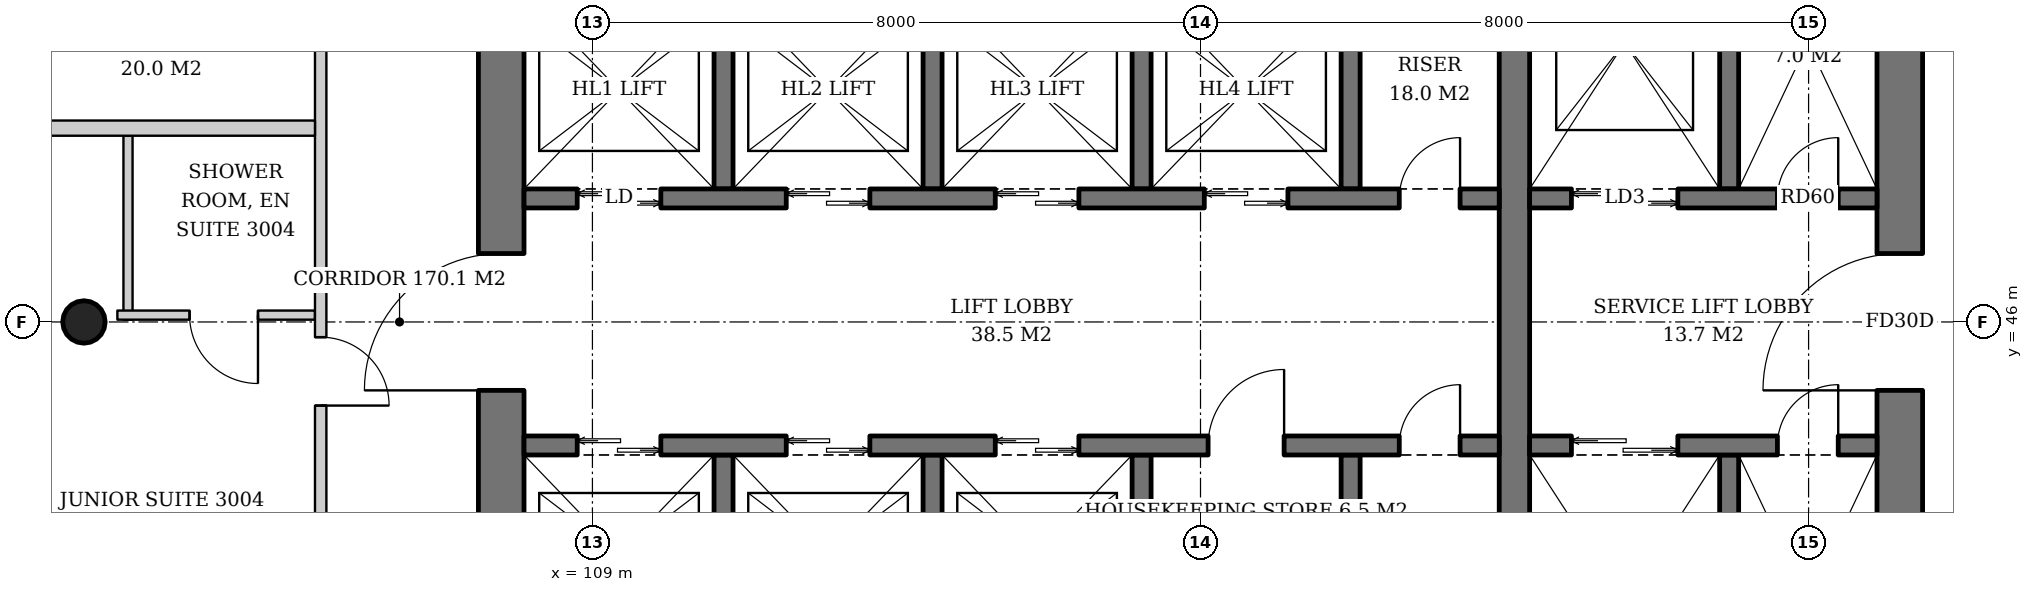
"""IFC4 building model, lengths in metres.
Left out: names, types, materials, properties, quantities, classifications, styles, units other than length and angle.
Written with IfcOpenShell. Run it as: python <this file> out.ifc"""

import sys

from ifc_helpers import new_model, si_unit, direction, frame, frame_2d, origin, origin_2d, place, context, subcontext, project, spatial, rectangle, hollow_circle, extrude, element, fill, save


model = new_model("IFC4")
c1 = context("Model", 3, precision=1e-05, world=origin(), true_north=direction((0.0, 1.0)))
c2 = subcontext(c1, "Body", "Model", "MODEL_VIEW")
j1 = project(units=[si_unit("LENGTHUNIT", "METRE"), si_unit("PLANEANGLEUNIT", "RADIAN")], contexts=[c1])
p1 = place(None, origin())
s1 = spatial("IfcSite", under=j1, at=p1, CompositionType="ELEMENT")
p2 = place(p1, origin())
s2 = spatial("IfcBuilding", under=s1, at=p2, CompositionType="ELEMENT")
p3 = place(p2, frame((0.0, 0.0, 119.8)))
s3 = spatial("IfcBuildingStorey", under=s2, at=p3, CompositionType="ELEMENT", Elevation=119.8)
p4 = place(p3, frame((102.259, 46.0, 0.0), z_axis=(0.043069538298, 0.0, 0.999072076915), x_axis=(0.0, 1.0, 0.0)))
e1 = element("IfcColumn", 1, at=p4, inside=s3, PredefinedType="COLUMN", context=c2, shape_type="SweptSolid", body=[
    extrude(hollow_circle(Radius=0.28, WallThickness=0.02, at=origin_2d()), origin(), (0.0, 0.0, 1.0), 3.803),
])
p5 = place(p3, frame((107.8, 37.1, 0.0), z_axis=(0.0, 0.0, 1.0), x_axis=(0.0, 1.0, 0.0)))
e2 = element("IfcWall", 2, at=p5, inside=s3, PredefinedType="SHEAR", context=c2, shape_type="SweptSolid", body=[
    extrude(rectangle(XDim=17.8, YDim=0.6, at=frame_2d((8.9, 0.0))), origin(), (0.0, 0.0, 1.0), 3.8),
])
p6 = place(p5, frame((8.0, 0.0, 0.0)))
e3 = element("IfcOpeningElement", 3, at=p6, cuts=e2, PredefinedType="OPENING", context=c2, shape_type="SweptSolid", body=[
    extrude(rectangle(XDim=1.8, YDim=2.4, at=frame_2d((0.9, 1.2))), frame((0.0, 0.31, 0.0), z_axis=(0.0, -1.0, 0.0), x_axis=(1.0, 0.0, 0.0)), (0.0, 0.0, 1.0), 0.62),
])
p7 = place(p3, frame((126.2, 37.1, 0.0), z_axis=(0.0, 0.0, 1.0), x_axis=(0.0, 1.0, 0.0)))
e4 = element("IfcWall", 4, at=p7, inside=s3, PredefinedType="SHEAR", context=c2, shape_type="SweptSolid", body=[
    extrude(rectangle(XDim=17.8, YDim=0.6, at=frame_2d((8.9, 0.0))), origin(), (0.0, 0.0, 1.0), 3.8),
])
p8 = place(p7, frame((8.0, 0.0, 0.0)))
e5 = element("IfcOpeningElement", 5, at=p8, cuts=e4, PredefinedType="OPENING", context=c2, shape_type="SweptSolid", body=[
    extrude(rectangle(XDim=1.8, YDim=2.4, at=frame_2d((0.9, 1.2))), frame((0.0, 0.31, 0.0), z_axis=(0.0, -1.0, 0.0), x_axis=(1.0, 0.0, 0.0)), (0.0, 0.0, 1.0), 0.62),
])
p9 = place(p3, frame((121.13, 40.4, 0.0), z_axis=(0.0, 0.0, 1.0), x_axis=(0.0, 1.0, 0.0)))
e6 = element("IfcWall", 6, at=p9, inside=s3, PredefinedType="SHEAR", context=c2, shape_type="SweptSolid", body=[
    extrude(rectangle(XDim=11.2, YDim=0.4, at=frame_2d((5.6, 0.0))), origin(), (0.0, 0.0, 1.0), 3.8),
])
for number, where, z_axis, x_axis in (
    (7, (110.725, 47.75, 0.0), (0.0, 0.0, 1.0), (0.0, 1.0, 0.0)),
    (8, (113.475, 47.75, 0.0), (0.0, 0.0, 1.0), (0.0, 1.0, 0.0)),
    (9, (116.225, 47.75, 0.0), (0.0, 0.0, 1.0), (0.0, 1.0, 0.0)),
    (10, (118.975, 47.75, 0.0), (0.0, 0.0, 1.0), (0.0, 1.0, 0.0)),
):
    element("IfcWall", number, at=place(p3, frame(where, z_axis=z_axis, x_axis=x_axis)), inside=s3, PredefinedType="SHEAR", context=c2, shape_type="SweptSolid", body=[
        extrude(rectangle(XDim=2.6, YDim=0.25, at=frame_2d((1.3, 0.0))), origin(), (0.0, 0.0, 1.0), 3.8),
    ])
p10 = place(p3, frame((108.1, 47.625, 0.0), z_axis=(0.0, 0.0, 1.0), x_axis=(1.0, 0.0, 0.0)))
e11 = element("IfcWall", 11, at=p10, inside=s3, PredefinedType="SHEAR", context=c2, shape_type="SweptSolid", body=[
    extrude(rectangle(XDim=12.83, YDim=0.25, at=frame_2d((6.415, 0.0))), origin(), (0.0, 0.0, 1.0), 3.8),
])
p11 = place(p10, frame((0.7, 0.0, 0.0)))
e12 = element("IfcOpeningElement", 12, at=p11, cuts=e11, PredefinedType="OPENING", context=c2, shape_type="SweptSolid", body=[
    extrude(rectangle(XDim=1.1, YDim=2.2, at=frame_2d((0.55, 1.1))), frame((0.0, 0.135, 0.0), z_axis=(0.0, -1.0, 0.0), x_axis=(1.0, 0.0, 0.0)), (0.0, 0.0, 1.0), 0.27),
])
p12 = place(p10, frame((3.45, 0.0, 0.0)))
e13 = element("IfcOpeningElement", 13, at=p12, cuts=e11, PredefinedType="OPENING", context=c2, shape_type="SweptSolid", body=[
    extrude(rectangle(XDim=1.1, YDim=2.2, at=frame_2d((0.55, 1.1))), frame((0.0, 0.135, 0.0), z_axis=(0.0, -1.0, 0.0), x_axis=(1.0, 0.0, 0.0)), (0.0, 0.0, 1.0), 0.27),
])
p13 = place(p10, frame((6.2, 0.0, 0.0)))
e14 = element("IfcOpeningElement", 14, at=p13, cuts=e11, PredefinedType="OPENING", context=c2, shape_type="SweptSolid", body=[
    extrude(rectangle(XDim=1.1, YDim=2.2, at=frame_2d((0.55, 1.1))), frame((0.0, 0.135, 0.0), z_axis=(0.0, -1.0, 0.0), x_axis=(1.0, 0.0, 0.0)), (0.0, 0.0, 1.0), 0.27),
])
p14 = place(p10, frame((8.95, 0.0, 0.0)))
e15 = element("IfcOpeningElement", 15, at=p14, cuts=e11, PredefinedType="OPENING", context=c2, shape_type="SweptSolid", body=[
    extrude(rectangle(XDim=1.1, YDim=2.2, at=frame_2d((0.55, 1.1))), frame((0.0, 0.135, 0.0), z_axis=(0.0, -1.0, 0.0), x_axis=(1.0, 0.0, 0.0)), (0.0, 0.0, 1.0), 0.27),
])
p15 = place(p10, frame((11.515, 0.0, 0.0)))
e16 = element("IfcOpeningElement", 16, at=p15, cuts=e11, PredefinedType="OPENING", context=c2, shape_type="SweptSolid", body=[
    extrude(rectangle(XDim=0.8, YDim=2.0, at=frame_2d((0.4, 1.0))), frame((0.0, 0.135, 0.0), z_axis=(0.0, -1.0, 0.0), x_axis=(1.0, 0.0, 0.0)), (0.0, 0.0, 1.0), 0.27),
])
for number, where, z_axis, x_axis in (
    (17, (110.725, 44.25, 0.0), (0.0, 0.0, 1.0), (0.0, -1.0, 0.0)),
    (18, (113.475, 44.25, 0.0), (0.0, 0.0, 1.0), (0.0, -1.0, 0.0)),
    (19, (116.225, 44.25, 0.0), (0.0, 0.0, 1.0), (0.0, -1.0, 0.0)),
    (20, (118.975, 44.25, 0.0), (0.0, 0.0, 1.0), (0.0, -1.0, 0.0)),
):
    element("IfcWall", number, at=place(p3, frame(where, z_axis=z_axis, x_axis=x_axis)), inside=s3, PredefinedType="SHEAR", context=c2, shape_type="SweptSolid", body=[
        extrude(rectangle(XDim=2.6, YDim=0.25, at=frame_2d((1.3, 0.0))), origin(), (0.0, 0.0, 1.0), 3.8),
    ])
p16 = place(p3, frame((108.1, 44.375, 0.0), z_axis=(0.0, 0.0, 1.0), x_axis=(1.0, 0.0, 0.0)))
e21 = element("IfcWall", 21, at=p16, inside=s3, PredefinedType="SHEAR", context=c2, shape_type="SweptSolid", body=[
    extrude(rectangle(XDim=12.83, YDim=0.25, at=frame_2d((6.415, 0.0))), origin(), (0.0, 0.0, 1.0), 3.8),
])
p17 = place(p16, frame((0.7, 0.0, 0.0)))
e22 = element("IfcOpeningElement", 22, at=p17, cuts=e21, PredefinedType="OPENING", context=c2, shape_type="SweptSolid", body=[
    extrude(rectangle(XDim=1.1, YDim=2.2, at=frame_2d((0.55, 1.1))), frame((0.0, 0.135, 0.0), z_axis=(0.0, -1.0, 0.0), x_axis=(1.0, 0.0, 0.0)), (0.0, 0.0, 1.0), 0.27),
])
p18 = place(p16, frame((3.45, 0.0, 0.0)))
e23 = element("IfcOpeningElement", 23, at=p18, cuts=e21, PredefinedType="OPENING", context=c2, shape_type="SweptSolid", body=[
    extrude(rectangle(XDim=1.1, YDim=2.2, at=frame_2d((0.55, 1.1))), frame((0.0, 0.135, 0.0), z_axis=(0.0, -1.0, 0.0), x_axis=(1.0, 0.0, 0.0)), (0.0, 0.0, 1.0), 0.27),
])
p19 = place(p16, frame((6.2, 0.0, 0.0)))
e24 = element("IfcOpeningElement", 24, at=p19, cuts=e21, PredefinedType="OPENING", context=c2, shape_type="SweptSolid", body=[
    extrude(rectangle(XDim=1.1, YDim=2.2, at=frame_2d((0.55, 1.1))), frame((0.0, 0.135, 0.0), z_axis=(0.0, -1.0, 0.0), x_axis=(1.0, 0.0, 0.0)), (0.0, 0.0, 1.0), 0.27),
])
p20 = place(p16, frame((9.0, 0.0, 0.0)))
e25 = element("IfcOpeningElement", 25, at=p20, cuts=e21, PredefinedType="OPENING", context=c2, shape_type="SweptSolid", body=[
    extrude(rectangle(XDim=1.0, YDim=2.1, at=frame_2d((0.5, 1.05))), frame((0.0, 0.135, 0.0), z_axis=(0.0, -1.0, 0.0), x_axis=(1.0, 0.0, 0.0)), (0.0, 0.0, 1.0), 0.27),
])
p21 = place(p16, frame((11.515, 0.0, 0.0)))
e26 = element("IfcOpeningElement", 26, at=p21, cuts=e21, PredefinedType="OPENING", context=c2, shape_type="SweptSolid", body=[
    extrude(rectangle(XDim=0.8, YDim=2.0, at=frame_2d((0.4, 1.0))), frame((0.0, 0.135, 0.0), z_axis=(0.0, -1.0, 0.0), x_axis=(1.0, 0.0, 0.0)), (0.0, 0.0, 1.0), 0.27),
])
p22 = place(p3, frame((123.955, 47.75, 0.0), z_axis=(0.0, 0.0, 1.0), x_axis=(0.0, 1.0, 0.0)))
e27 = element("IfcWall", 27, at=p22, inside=s3, PredefinedType="SHEAR", context=c2, shape_type="SweptSolid", body=[
    extrude(rectangle(XDim=3.85, YDim=0.25, at=frame_2d((1.925, 0.0))), origin(), (0.0, 0.0, 1.0), 3.8),
])
p23 = place(p3, frame((121.33, 47.625, 0.0), z_axis=(0.0, 0.0, 1.0), x_axis=(1.0, 0.0, 0.0)))
e28 = element("IfcWall", 28, at=p23, inside=s3, PredefinedType="SHEAR", context=c2, shape_type="SweptSolid", body=[
    extrude(rectangle(XDim=4.57, YDim=0.25, at=frame_2d((2.285, 0.0))), origin(), (0.0, 0.0, 1.0), 3.8),
])
p24 = place(p23, frame((0.55, 0.0, 0.0)))
e29 = element("IfcOpeningElement", 29, at=p24, cuts=e28, PredefinedType="OPENING", context=c2, shape_type="SweptSolid", body=[
    extrude(rectangle(XDim=1.4, YDim=2.4, at=frame_2d((0.7, 1.2))), frame((0.0, 0.135, 0.0), z_axis=(0.0, -1.0, 0.0), x_axis=(1.0, 0.0, 0.0)), (0.0, 0.0, 1.0), 0.27),
])
p25 = place(p23, frame((3.26, 0.0, 0.0)))
e30 = element("IfcOpeningElement", 30, at=p25, cuts=e28, PredefinedType="OPENING", context=c2, shape_type="SweptSolid", body=[
    extrude(rectangle(XDim=0.8, YDim=2.0, at=frame_2d((0.4, 1.0))), frame((0.0, 0.135, 0.0), z_axis=(0.0, -1.0, 0.0), x_axis=(1.0, 0.0, 0.0)), (0.0, 0.0, 1.0), 0.27),
])
p26 = place(p3, frame((123.955, 44.25, 0.0), z_axis=(0.0, 0.0, 1.0), x_axis=(0.0, -1.0, 0.0)))
e31 = element("IfcWall", 31, at=p26, inside=s3, PredefinedType="SHEAR", context=c2, shape_type="SweptSolid", body=[
    extrude(rectangle(XDim=3.85, YDim=0.25, at=frame_2d((1.925, 0.0))), origin(), (0.0, 0.0, 1.0), 3.8),
])
p27 = place(p3, frame((121.33, 44.375, 0.0), z_axis=(0.0, 0.0, 1.0), x_axis=(1.0, 0.0, 0.0)))
e32 = element("IfcWall", 32, at=p27, inside=s3, PredefinedType="SHEAR", context=c2, shape_type="SweptSolid", body=[
    extrude(rectangle(XDim=4.57, YDim=0.25, at=frame_2d((2.285, 0.0))), origin(), (0.0, 0.0, 1.0), 3.8),
])
p28 = place(p27, frame((0.55, 0.0, 0.0)))
e33 = element("IfcOpeningElement", 33, at=p28, cuts=e32, PredefinedType="OPENING", context=c2, shape_type="SweptSolid", body=[
    extrude(rectangle(XDim=1.4, YDim=2.4, at=frame_2d((0.7, 1.2))), frame((0.0, 0.135, 0.0), z_axis=(0.0, -1.0, 0.0), x_axis=(1.0, 0.0, 0.0)), (0.0, 0.0, 1.0), 0.27),
])
p29 = place(p27, frame((3.26, 0.0, 0.0)))
e34 = element("IfcOpeningElement", 34, at=p29, cuts=e32, PredefinedType="OPENING", context=c2, shape_type="SweptSolid", body=[
    extrude(rectangle(XDim=0.8, YDim=2.0, at=frame_2d((0.4, 1.0))), frame((0.0, 0.135, 0.0), z_axis=(0.0, -1.0, 0.0), x_axis=(1.0, 0.0, 0.0)), (0.0, 0.0, 1.0), 0.27),
])
p30 = place(p3, frame((102.89, 48.45, 0.0), z_axis=(0.0, 0.0, 1.0), x_axis=(0.0, -1.0, 0.0)))
e35 = element("IfcWall", 35, at=p30, inside=s3, PredefinedType="PARTITIONING", context=c2, shape_type="SweptSolid", body=[
    extrude(rectangle(XDim=2.42, YDim=0.12, at=frame_2d((1.21, 0.0))), origin(), (0.0, 0.0, 1.0), 3.0),
])
p31 = place(p3, frame((105.35, 46.09, 0.0), z_axis=(0.0, 0.0, 1.0), x_axis=(-1.0, 0.0, 0.0)))
e36 = element("IfcWall", 36, at=p31, inside=s3, PredefinedType="PARTITIONING", context=c2, shape_type="SweptSolid", body=[
    extrude(rectangle(XDim=2.6, YDim=0.12, at=frame_2d((1.3, 0.0))), origin(), (0.0, 0.0, 1.0), 3.6),
])
p32 = place(p31, frame((0.75, 0.0, 0.0)))
e37 = element("IfcOpeningElement", 37, at=p32, cuts=e36, PredefinedType="OPENING", context=c2, shape_type="SweptSolid", body=[
    extrude(rectangle(XDim=0.9, YDim=2.1, at=frame_2d((0.45, 1.05))), frame((0.0, 0.07, 0.0), z_axis=(0.0, -1.0, 0.0), x_axis=(1.0, 0.0, 0.0)), (0.0, 0.0, 1.0), 0.14),
])
p33 = place(p3, frame((105.425, 56.793, 0.0), z_axis=(0.0, 0.0, 1.0), x_axis=(0.0, -1.0, 0.0)))
e38 = element("IfcWall", 38, at=p33, inside=s3, PredefinedType="PARTITIONING", context=c2, shape_type="SweptSolid", body=[
    extrude(rectangle(XDim=21.586, YDim=0.15, at=frame_2d((10.793, 0.0))), origin(), (0.0, 0.0, 1.0), 2.9),
])
p34 = place(p33, frame((0.718, 0.0, 0.0)))
e39 = element("IfcOpeningElement", 39, at=p34, cuts=e38, PredefinedType="OPENING", context=c2, shape_type="SweptSolid", body=[
    extrude(rectangle(XDim=0.9, YDim=2.1, at=frame_2d((0.45, 1.05))), frame((0.0, 0.085, 0.0), z_axis=(0.0, -1.0, 0.0), x_axis=(1.0, 0.0, 0.0)), (0.0, 0.0, 1.0), 0.17),
])
p35 = place(p33, frame((5.843, 0.0, 0.0)))
e40 = element("IfcOpeningElement", 40, at=p35, cuts=e38, PredefinedType="OPENING", context=c2, shape_type="SweptSolid", body=[
    extrude(rectangle(XDim=1.0, YDim=2.1, at=frame_2d((0.5, 1.05))), frame((0.0, 0.085, 0.0), z_axis=(0.0, -1.0, 0.0), x_axis=(1.0, 0.0, 0.0)), (0.0, 0.0, 1.0), 0.17),
])
p36 = place(p33, frame((10.993, 0.0, 0.0)))
e41 = element("IfcOpeningElement", 41, at=p36, cuts=e38, PredefinedType="OPENING", context=c2, shape_type="SweptSolid", body=[
    extrude(rectangle(XDim=0.9, YDim=2.1, at=frame_2d((0.45, 1.05))), frame((0.0, 0.085, 0.0), z_axis=(0.0, -1.0, 0.0), x_axis=(1.0, 0.0, 0.0)), (0.0, 0.0, 1.0), 0.17),
])
p37 = place(p3, frame((105.35, 48.55, 0.0), z_axis=(0.0, 0.0, 1.0), x_axis=(-1.0, 0.0, 0.0)))
e42 = element("IfcWall", 42, at=p37, inside=s3, PredefinedType="PARTITIONING", context=c2, shape_type="SweptSolid", body=[
    extrude(rectangle(XDim=4.14, YDim=0.2, at=frame_2d((2.07, 0.0))), origin(), (0.0, 0.0, 1.0), 3.2),
])
p38 = place(p11, origin())
e43 = element("IfcDoor", 43, at=p38, inside=s3, OperationType="DOUBLE_DOOR_SLIDING", PredefinedType="DOOR", context=c2, shape_type="SweptSolid", body=[
    extrude(rectangle(XDim=1.1, YDim=2.2, at=frame_2d((0.55, 1.1))), frame((0.0, 0.025, 0.0), z_axis=(0.0, -1.0, 0.0), x_axis=(1.0, 0.0, 0.0)), (0.0, 0.0, 1.0), 0.05),
])
fill(e12, e43)
p39 = place(p12, origin())
e44 = element("IfcDoor", 44, at=p39, inside=s3, OperationType="DOUBLE_DOOR_SLIDING", PredefinedType="DOOR", context=c2, shape_type="SweptSolid", body=[
    extrude(rectangle(XDim=1.1, YDim=2.2, at=frame_2d((0.55, 1.1))), frame((0.0, 0.025, 0.0), z_axis=(0.0, -1.0, 0.0), x_axis=(1.0, 0.0, 0.0)), (0.0, 0.0, 1.0), 0.05),
])
fill(e13, e44)
p40 = place(p13, origin())
e45 = element("IfcDoor", 45, at=p40, inside=s3, OperationType="DOUBLE_DOOR_SLIDING", PredefinedType="DOOR", context=c2, shape_type="SweptSolid", body=[
    extrude(rectangle(XDim=1.1, YDim=2.2, at=frame_2d((0.55, 1.1))), frame((0.0, 0.025, 0.0), z_axis=(0.0, -1.0, 0.0), x_axis=(1.0, 0.0, 0.0)), (0.0, 0.0, 1.0), 0.05),
])
fill(e14, e45)
p41 = place(p14, origin())
e46 = element("IfcDoor", 46, at=p41, inside=s3, OperationType="DOUBLE_DOOR_SLIDING", PredefinedType="DOOR", context=c2, shape_type="SweptSolid", body=[
    extrude(rectangle(XDim=1.1, YDim=2.2, at=frame_2d((0.55, 1.1))), frame((0.0, 0.025, 0.0), z_axis=(0.0, -1.0, 0.0), x_axis=(1.0, 0.0, 0.0)), (0.0, 0.0, 1.0), 0.05),
])
fill(e15, e46)
p42 = place(p15, origin())
e47 = element("IfcDoor", 47, at=p42, inside=s3, OperationType="SINGLE_SWING_RIGHT", PredefinedType="DOOR", context=c2, shape_type="SweptSolid", body=[
    extrude(rectangle(XDim=0.8, YDim=2.0, at=frame_2d((0.4, 1.0))), frame((0.0, 0.025, 0.0), z_axis=(0.0, -1.0, 0.0), x_axis=(1.0, 0.0, 0.0)), (0.0, 0.0, 1.0), 0.05),
])
fill(e16, e47)
p43 = place(p17, origin())
e48 = element("IfcDoor", 48, at=p43, inside=s3, OperationType="DOUBLE_DOOR_SLIDING", PredefinedType="DOOR", context=c2, shape_type="SweptSolid", body=[
    extrude(rectangle(XDim=1.1, YDim=2.2, at=frame_2d((0.55, 1.1))), frame((0.0, 0.025, 0.0), z_axis=(0.0, -1.0, 0.0), x_axis=(1.0, 0.0, 0.0)), (0.0, 0.0, 1.0), 0.05),
])
fill(e22, e48)
p44 = place(p18, origin())
e49 = element("IfcDoor", 49, at=p44, inside=s3, OperationType="DOUBLE_DOOR_SLIDING", PredefinedType="DOOR", context=c2, shape_type="SweptSolid", body=[
    extrude(rectangle(XDim=1.1, YDim=2.2, at=frame_2d((0.55, 1.1))), frame((0.0, 0.025, 0.0), z_axis=(0.0, -1.0, 0.0), x_axis=(1.0, 0.0, 0.0)), (0.0, 0.0, 1.0), 0.05),
])
fill(e23, e49)
p45 = place(p19, origin())
e50 = element("IfcDoor", 50, at=p45, inside=s3, OperationType="DOUBLE_DOOR_SLIDING", PredefinedType="DOOR", context=c2, shape_type="SweptSolid", body=[
    extrude(rectangle(XDim=1.1, YDim=2.2, at=frame_2d((0.55, 1.1))), frame((0.0, 0.025, 0.0), z_axis=(0.0, -1.0, 0.0), x_axis=(1.0, 0.0, 0.0)), (0.0, 0.0, 1.0), 0.05),
])
fill(e24, e50)
p46 = place(p20, origin())
e51 = element("IfcDoor", 51, at=p46, inside=s3, OperationType="SINGLE_SWING_RIGHT", PredefinedType="DOOR", context=c2, shape_type="SweptSolid", body=[
    extrude(rectangle(XDim=1.0, YDim=2.1, at=frame_2d((0.5, 1.05))), frame((0.0, 0.025, 0.0), z_axis=(0.0, -1.0, 0.0), x_axis=(1.0, 0.0, 0.0)), (0.0, 0.0, 1.0), 0.05),
])
fill(e25, e51)
p47 = place(p21, origin())
e52 = element("IfcDoor", 52, at=p47, inside=s3, OperationType="SINGLE_SWING_RIGHT", PredefinedType="DOOR", context=c2, shape_type="SweptSolid", body=[
    extrude(rectangle(XDim=0.8, YDim=2.0, at=frame_2d((0.4, 1.0))), frame((0.0, 0.025, 0.0), z_axis=(0.0, -1.0, 0.0), x_axis=(1.0, 0.0, 0.0)), (0.0, 0.0, 1.0), 0.05),
])
fill(e26, e52)
p48 = place(p24, origin())
e53 = element("IfcDoor", 53, at=p48, inside=s3, OperationType="DOUBLE_DOOR_SLIDING", PredefinedType="DOOR", context=c2, shape_type="SweptSolid", body=[
    extrude(rectangle(XDim=1.4, YDim=2.4, at=frame_2d((0.7, 1.2))), frame((0.0, 0.025, 0.0), z_axis=(0.0, -1.0, 0.0), x_axis=(1.0, 0.0, 0.0)), (0.0, 0.0, 1.0), 0.05),
])
fill(e29, e53)
p49 = place(p25, origin())
e54 = element("IfcDoor", 54, at=p49, inside=s3, OperationType="SINGLE_SWING_RIGHT", PredefinedType="DOOR", context=c2, shape_type="SweptSolid", body=[
    extrude(rectangle(XDim=0.8, YDim=2.0, at=frame_2d((0.4, 1.0))), frame((0.0, 0.025, 0.0), z_axis=(0.0, -1.0, 0.0), x_axis=(1.0, 0.0, 0.0)), (0.0, 0.0, 1.0), 0.05),
])
fill(e30, e54)
p50 = place(p28, origin())
e55 = element("IfcDoor", 55, at=p50, inside=s3, OperationType="DOUBLE_DOOR_SLIDING", PredefinedType="DOOR", context=c2, shape_type="SweptSolid", body=[
    extrude(rectangle(XDim=1.4, YDim=2.4, at=frame_2d((0.7, 1.2))), frame((0.0, 0.025, 0.0), z_axis=(0.0, -1.0, 0.0), x_axis=(1.0, 0.0, 0.0)), (0.0, 0.0, 1.0), 0.05),
])
fill(e33, e55)
p51 = place(p29, origin())
e56 = element("IfcDoor", 56, at=p51, inside=s3, OperationType="SINGLE_SWING_RIGHT", PredefinedType="DOOR", context=c2, shape_type="SweptSolid", body=[
    extrude(rectangle(XDim=0.8, YDim=2.0, at=frame_2d((0.4, 1.0))), frame((0.0, 0.025, 0.0), z_axis=(0.0, -1.0, 0.0), x_axis=(1.0, 0.0, 0.0)), (0.0, 0.0, 1.0), 0.05),
])
fill(e34, e56)
p52 = place(p6, origin())
e57 = element("IfcDoor", 57, at=p52, inside=s3, OperationType="DOUBLE_DOOR_SINGLE_SWING", PredefinedType="DOOR", context=c2, shape_type="SweptSolid", body=[
    extrude(rectangle(XDim=1.8, YDim=2.4, at=frame_2d((0.9, 1.2))), frame((0.0, 0.025, 0.0), z_axis=(0.0, -1.0, 0.0), x_axis=(1.0, 0.0, 0.0)), (0.0, 0.0, 1.0), 0.05),
])
fill(e3, e57)
p53 = place(p8, origin())
e58 = element("IfcDoor", 58, at=p53, inside=s3, OperationType="DOUBLE_DOOR_SINGLE_SWING", PredefinedType="DOOR", context=c2, shape_type="SweptSolid", body=[
    extrude(rectangle(XDim=1.8, YDim=2.4, at=frame_2d((0.9, 1.2))), frame((0.0, 0.025, 0.0), z_axis=(0.0, -1.0, 0.0), x_axis=(1.0, 0.0, 0.0)), (0.0, 0.0, 1.0), 0.05),
])
fill(e5, e58)
p54 = place(p32, origin())
e59 = element("IfcDoor", 59, at=p54, inside=s3, OperationType="SINGLE_SWING_LEFT", PredefinedType="DOOR", context=c2, shape_type="SweptSolid", body=[
    extrude(rectangle(XDim=0.9, YDim=2.1, at=frame_2d((0.45, 1.05))), frame((0.0, 0.025, 0.0), z_axis=(0.0, -1.0, 0.0), x_axis=(1.0, 0.0, 0.0)), (0.0, 0.0, 1.0), 0.05),
])
fill(e37, e59)
p55 = place(p36, origin())
e60 = element("IfcDoor", 60, at=p55, inside=s3, OperationType="SINGLE_SWING_RIGHT", PredefinedType="DOOR", context=c2, shape_type="SweptSolid", body=[
    extrude(rectangle(XDim=0.9, YDim=2.1, at=frame_2d((0.45, 1.05))), frame((0.0, 0.025, 0.0), z_axis=(0.0, -1.0, 0.0), x_axis=(1.0, 0.0, 0.0)), (0.0, 0.0, 1.0), 0.05),
])
fill(e41, e60)
save(model, sys.argv[1])
